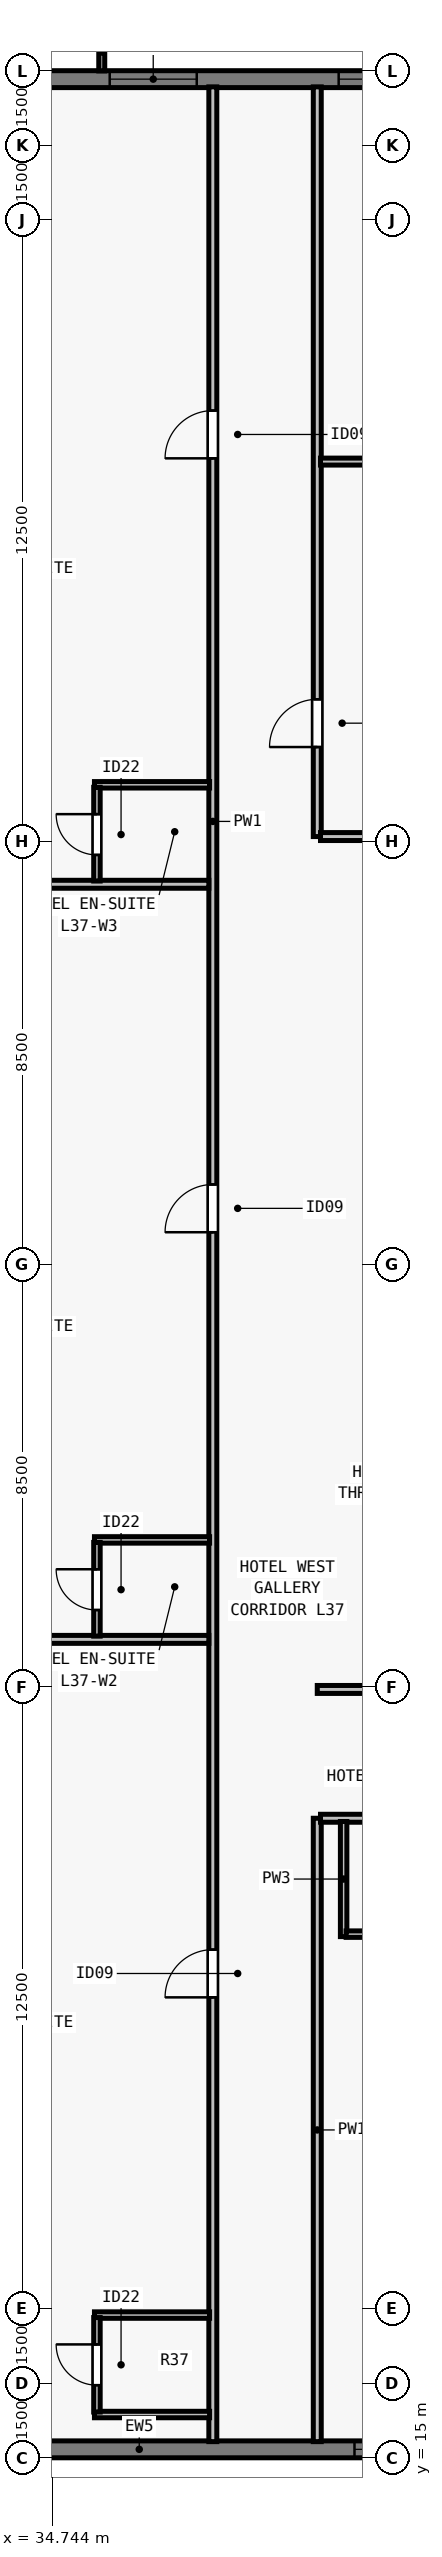
"""IFC4 building model, lengths in metres.
Left out: names, types, materials, properties, quantities, classifications, styles, units other than length and angle.
Written with IfcOpenShell. Run it as: python <this file> out.ifc"""

import sys

from ifc_helpers import new_model, si_unit, direction, frame, frame_2d, origin, place, context, subcontext, project, spatial, rectangle, extrude, element, fill, save


model = new_model("IFC4")
c1 = context("Model", 3, precision=1e-05, world=origin(), true_north=direction((0.0, 1.0)))
c2 = subcontext(c1, "Body", "Model", "MODEL_VIEW")
j1 = project(units=[si_unit("LENGTHUNIT", "METRE"), si_unit("PLANEANGLEUNIT", "RADIAN")], contexts=[c1])
p1 = place(None, origin())
s1 = spatial("IfcSite", under=j1, at=p1, CompositionType="ELEMENT")
p2 = place(p1, origin())
s2 = spatial("IfcBuilding", under=s1, at=p2, CompositionType="ELEMENT")
p3 = place(p2, frame((0.0, 0.0, 137.5)))
s3 = spatial("IfcBuildingStorey", under=s2, at=p3, CompositionType="ELEMENT", Elevation=137.5)
p4 = place(p3, frame((32.0, 62.83, 0.0), z_axis=(0.0, 0.0, 1.0), x_axis=(1.0, 0.0, 0.0)))
e1 = element("IfcWall", 1, at=p4, inside=s3, PredefinedType="SOLIDWALL", context=c2, shape_type="SweptSolid", body=[
    extrude(rectangle(XDim=39.682, YDim=0.34, at=frame_2d((19.841, 0.0))), origin(), (0.0, 0.0, 1.0), 3.28),
])
p5 = place(p4, frame((3.902, 0.0, 0.8)))
e2 = element("IfcOpeningElement", 2, at=p5, cuts=e1, PredefinedType="OPENING", context=c2, shape_type="SweptSolid", body=[
    extrude(rectangle(XDim=1.75, YDim=1.66, at=frame_2d((0.875, 0.83))), frame((0.0, 0.18, 0.0), z_axis=(0.0, -1.0, 0.0), x_axis=(1.0, 0.0, 0.0)), (0.0, 0.0, 1.0), 0.36),
])
p6 = place(p4, frame((8.505, 0.0, 0.8)))
e3 = element("IfcOpeningElement", 3, at=p6, cuts=e1, PredefinedType="OPENING", context=c2, shape_type="SweptSolid", body=[
    extrude(rectangle(XDim=1.35, YDim=1.66, at=frame_2d((0.675, 0.83))), frame((0.0, 0.18, 0.0), z_axis=(0.0, -1.0, 0.0), x_axis=(1.0, 0.0, 0.0)), (0.0, 0.0, 1.0), 0.36),
])
p7 = place(p4, frame((11.859, 0.0, 0.8)))
e4 = element("IfcOpeningElement", 4, at=p7, cuts=e1, PredefinedType="OPENING", context=c2, shape_type="SweptSolid", body=[
    extrude(rectangle(XDim=1.75, YDim=1.66, at=frame_2d((0.875, 0.83))), frame((0.0, 0.18, 0.0), z_axis=(0.0, -1.0, 0.0), x_axis=(1.0, 0.0, 0.0)), (0.0, 0.0, 1.0), 0.36),
])
p8 = place(p4, frame((16.062, 0.0, 0.8)))
e5 = element("IfcOpeningElement", 5, at=p8, cuts=e1, PredefinedType="OPENING", context=c2, shape_type="SweptSolid", body=[
    extrude(rectangle(XDim=1.35, YDim=1.66, at=frame_2d((0.675, 0.83))), frame((0.0, 0.18, 0.0), z_axis=(0.0, -1.0, 0.0), x_axis=(1.0, 0.0, 0.0)), (0.0, 0.0, 1.0), 0.36),
])
p9 = place(p4, frame((17.716, 0.0, 0.8)))
e6 = element("IfcOpeningElement", 6, at=p9, cuts=e1, PredefinedType="OPENING", context=c2, shape_type="SweptSolid", body=[
    extrude(rectangle(XDim=1.75, YDim=1.66, at=frame_2d((0.875, 0.83))), frame((0.0, 0.18, 0.0), z_axis=(0.0, -1.0, 0.0), x_axis=(1.0, 0.0, 0.0)), (0.0, 0.0, 1.0), 0.36),
])
p10 = place(p4, frame((22.719, 0.0, 0.8)))
e7 = element("IfcOpeningElement", 7, at=p10, cuts=e1, PredefinedType="OPENING", context=c2, shape_type="SweptSolid", body=[
    extrude(rectangle(XDim=1.35, YDim=1.66, at=frame_2d((0.675, 0.83))), frame((0.0, 0.18, 0.0), z_axis=(0.0, -1.0, 0.0), x_axis=(1.0, 0.0, 0.0)), (0.0, 0.0, 1.0), 0.36),
])
p11 = place(p4, frame((26.073, 0.0, 0.8)))
e8 = element("IfcOpeningElement", 8, at=p11, cuts=e1, PredefinedType="OPENING", context=c2, shape_type="SweptSolid", body=[
    extrude(rectangle(XDim=1.75, YDim=1.66, at=frame_2d((0.875, 0.83))), frame((0.0, 0.18, 0.0), z_axis=(0.0, -1.0, 0.0), x_axis=(1.0, 0.0, 0.0)), (0.0, 0.0, 1.0), 0.36),
])
p12 = place(p4, frame((30.677, 0.0, 0.8)))
e9 = element("IfcOpeningElement", 9, at=p12, cuts=e1, PredefinedType="OPENING", context=c2, shape_type="SweptSolid", body=[
    extrude(rectangle(XDim=1.35, YDim=1.66, at=frame_2d((0.675, 0.83))), frame((0.0, 0.18, 0.0), z_axis=(0.0, -1.0, 0.0), x_axis=(1.0, 0.0, 0.0)), (0.0, 0.0, 1.0), 0.36),
])
p13 = place(p4, frame((33.18, 0.0, 0.8)))
e10 = element("IfcOpeningElement", 10, at=p13, cuts=e1, PredefinedType="OPENING", context=c2, shape_type="SweptSolid", body=[
    extrude(rectangle(XDim=1.75, YDim=1.66, at=frame_2d((0.875, 0.83))), frame((0.0, 0.18, 0.0), z_axis=(0.0, -1.0, 0.0), x_axis=(1.0, 0.0, 0.0)), (0.0, 0.0, 1.0), 0.36),
])
p14 = place(p3, frame((72.0, 15.17, 0.0), z_axis=(0.0, 0.0, 1.0), x_axis=(-1.0, 0.0, 0.0)))
e11 = element("IfcWall", 11, at=p14, inside=s3, PredefinedType="SOLIDWALL", context=c2, shape_type="SweptSolid", body=[
    extrude(rectangle(XDim=39.682, YDim=0.34, at=frame_2d((19.841, 0.0))), origin(), (0.0, 0.0, 1.0), 3.28),
])
p15 = place(p14, frame((8.055, 0.0, 0.8)))
e12 = element("IfcOpeningElement", 12, at=p15, cuts=e11, PredefinedType="OPENING", context=c2, shape_type="SweptSolid", body=[
    extrude(rectangle(XDim=1.35, YDim=1.66, at=frame_2d((0.675, 0.83))), frame((0.0, 0.18, 0.0), z_axis=(0.0, -1.0, 0.0), x_axis=(1.0, 0.0, 0.0)), (0.0, 0.0, 1.0), 0.36),
])
p16 = place(p14, frame((11.859, 0.0, 0.8)))
e13 = element("IfcOpeningElement", 13, at=p16, cuts=e11, PredefinedType="OPENING", context=c2, shape_type="SweptSolid", body=[
    extrude(rectangle(XDim=1.75, YDim=1.66, at=frame_2d((0.875, 0.83))), frame((0.0, 0.18, 0.0), z_axis=(0.0, -1.0, 0.0), x_axis=(1.0, 0.0, 0.0)), (0.0, 0.0, 1.0), 0.36),
])
p17 = place(p14, frame((16.062, 0.0, 0.8)))
e14 = element("IfcOpeningElement", 14, at=p17, cuts=e11, PredefinedType="OPENING", context=c2, shape_type="SweptSolid", body=[
    extrude(rectangle(XDim=1.35, YDim=1.66, at=frame_2d((0.675, 0.83))), frame((0.0, 0.18, 0.0), z_axis=(0.0, -1.0, 0.0), x_axis=(1.0, 0.0, 0.0)), (0.0, 0.0, 1.0), 0.36),
])
p18 = place(p14, frame((18.966, 0.0, 0.8)))
e15 = element("IfcOpeningElement", 15, at=p18, cuts=e11, PredefinedType="OPENING", context=c2, shape_type="SweptSolid", body=[
    extrude(rectangle(XDim=1.75, YDim=1.66, at=frame_2d((0.875, 0.83))), frame((0.0, 0.18, 0.0), z_axis=(0.0, -1.0, 0.0), x_axis=(1.0, 0.0, 0.0)), (0.0, 0.0, 1.0), 0.36),
])
p19 = place(p14, frame((22.719, 0.0, 0.8)))
e16 = element("IfcOpeningElement", 16, at=p19, cuts=e11, PredefinedType="OPENING", context=c2, shape_type="SweptSolid", body=[
    extrude(rectangle(XDim=1.35, YDim=1.66, at=frame_2d((0.675, 0.83))), frame((0.0, 0.18, 0.0), z_axis=(0.0, -1.0, 0.0), x_axis=(1.0, 0.0, 0.0)), (0.0, 0.0, 1.0), 0.36),
])
p20 = place(p14, frame((26.523, 0.0, 0.8)))
e17 = element("IfcOpeningElement", 17, at=p20, cuts=e11, PredefinedType="OPENING", context=c2, shape_type="SweptSolid", body=[
    extrude(rectangle(XDim=1.75, YDim=1.66, at=frame_2d((0.875, 0.83))), frame((0.0, 0.18, 0.0), z_axis=(0.0, -1.0, 0.0), x_axis=(1.0, 0.0, 0.0)), (0.0, 0.0, 1.0), 0.36),
])
p21 = place(p14, frame((29.827, 0.0, 0.8)))
e18 = element("IfcOpeningElement", 18, at=p21, cuts=e11, PredefinedType="OPENING", context=c2, shape_type="SweptSolid", body=[
    extrude(rectangle(XDim=1.35, YDim=1.66, at=frame_2d((0.675, 0.83))), frame((0.0, 0.18, 0.0), z_axis=(0.0, -1.0, 0.0), x_axis=(1.0, 0.0, 0.0)), (0.0, 0.0, 1.0), 0.36),
])
p22 = place(p3, frame((37.975, 15.325, 0.0), z_axis=(0.0, 0.0, 1.0), x_axis=(0.0, 1.0, 0.0)))
e19 = element("IfcWall", 19, at=p22, inside=s3, PredefinedType="PARTITIONING", context=c2, shape_type="SweptSolid", body=[
    extrude(rectangle(XDim=47.35, YDim=0.16, at=frame_2d((23.675, 0.0))), origin(), (0.0, 0.0, 1.0), 2.555),
])
p23 = place(p22, frame((8.934, 0.0, 0.0)))
e20 = element("IfcOpeningElement", 20, at=p23, cuts=e19, PredefinedType="OPENING", context=c2, shape_type="SweptSolid", body=[
    extrude(rectangle(XDim=0.96, YDim=2.15, at=frame_2d((0.48, 1.075))), frame((0.0, 0.09, 0.0), z_axis=(0.0, -1.0, 0.0), x_axis=(1.0, 0.0, 0.0)), (0.0, 0.0, 1.0), 0.18),
])
p24 = place(p22, frame((24.319, 0.0, 0.0)))
e21 = element("IfcOpeningElement", 21, at=p24, cuts=e19, PredefinedType="OPENING", context=c2, shape_type="SweptSolid", body=[
    extrude(rectangle(XDim=0.96, YDim=2.15, at=frame_2d((0.48, 1.075))), frame((0.0, 0.09, 0.0), z_axis=(0.0, -1.0, 0.0), x_axis=(1.0, 0.0, 0.0)), (0.0, 0.0, 1.0), 0.18),
])
p25 = place(p22, frame((39.88, 0.0, 0.0)))
e22 = element("IfcOpeningElement", 22, at=p25, cuts=e19, PredefinedType="OPENING", context=c2, shape_type="SweptSolid", body=[
    extrude(rectangle(XDim=0.96, YDim=2.15, at=frame_2d((0.48, 1.075))), frame((0.0, 0.09, 0.0), z_axis=(0.0, -1.0, 0.0), x_axis=(1.0, 0.0, 0.0)), (0.0, 0.0, 1.0), 0.18),
])
p26 = place(p3, frame((40.075, 15.325, 0.0), z_axis=(0.0, 0.0, 1.0), x_axis=(0.0, 1.0, 0.0)))
e23 = element("IfcWall", 23, at=p26, inside=s3, PredefinedType="PARTITIONING", context=c2, shape_type="SweptSolid", body=[
    extrude(rectangle(XDim=12.535, YDim=0.16, at=frame_2d((6.268, 0.0))), origin(), (0.0, 0.0, 1.0), 2.555),
])
p27 = place(p3, frame((40.075, 47.6, 0.0), z_axis=(0.0, 0.0, 1.0), x_axis=(0.0, 1.0, 0.0)))
e24 = element("IfcWall", 24, at=p27, inside=s3, PredefinedType="PARTITIONING", context=c2, shape_type="SweptSolid", body=[
    extrude(rectangle(XDim=15.075, YDim=0.16, at=frame_2d((7.538, 0.0))), origin(), (0.0, 0.0, 1.0), 2.555),
])
p28 = place(p27, frame((1.8, 0.0, 0.0)))
e25 = element("IfcOpeningElement", 25, at=p28, cuts=e24, PredefinedType="OPENING", context=c2, shape_type="SweptSolid", body=[
    extrude(rectangle(XDim=0.96, YDim=2.12, at=frame_2d((0.48, 1.06))), frame((0.0, 0.09, 0.0), z_axis=(0.0, -1.0, 0.0), x_axis=(1.0, 0.0, 0.0)), (0.0, 0.0, 1.0), 0.18),
])
p29 = place(p3, frame((40.075, 30.45, 0.0), z_axis=(0.0, 0.0, 1.0), x_axis=(1.0, 0.0, 0.0)))
e26 = element("IfcWall", 26, at=p29, inside=s3, PredefinedType="PARTITIONING", context=c2, shape_type="SweptSolid", body=[
    extrude(rectangle(XDim=3.16, YDim=0.16, at=frame_2d((1.58, 0.0))), origin(), (0.0, 0.0, 1.0), 3.28),
])
p30 = place(p3, frame((40.14, 47.6, 0.0), z_axis=(0.0, 0.0, 1.0), x_axis=(1.0, 0.0, 0.0)))
e27 = element("IfcWall", 27, at=p30, inside=s3, PredefinedType="PARTITIONING", context=c2, shape_type="SweptSolid", body=[
    extrude(rectangle(XDim=3.095, YDim=0.16, at=frame_2d((1.548, 0.0))), origin(), (0.0, 0.0, 1.0), 3.28),
])
p31 = place(p3, frame((40.14, 27.86, 0.0), z_axis=(0.0, 0.0, 1.0), x_axis=(1.0, 0.0, 0.0)))
e28 = element("IfcWall", 28, at=p31, inside=s3, PredefinedType="PARTITIONING", context=c2, shape_type="SweptSolid", body=[
    extrude(rectangle(XDim=22.07, YDim=0.16, at=frame_2d((11.035, 0.0))), origin(), (0.0, 0.0, 1.0), 3.28),
])
p32 = place(p31, frame((3.834, 0.0, 0.0)))
e29 = element("IfcOpeningElement", 29, at=p32, cuts=e28, PredefinedType="OPENING", context=c2, shape_type="SweptSolid", body=[
    extrude(rectangle(XDim=0.96, YDim=2.15, at=frame_2d((0.48, 1.075))), frame((0.0, 0.09, 0.0), z_axis=(0.0, -1.0, 0.0), x_axis=(1.0, 0.0, 0.0)), (0.0, 0.0, 1.0), 0.18),
])
p33 = place(p31, frame((8.746, 0.0, 0.0)))
e30 = element("IfcOpeningElement", 30, at=p33, cuts=e28, PredefinedType="OPENING", context=c2, shape_type="SweptSolid", body=[
    extrude(rectangle(XDim=0.96, YDim=2.15, at=frame_2d((0.48, 1.075))), frame((0.0, 0.09, 0.0), z_axis=(0.0, -1.0, 0.0), x_axis=(1.0, 0.0, 0.0)), (0.0, 0.0, 1.0), 0.18),
])
p34 = place(p31, frame((14.46, 0.0, 0.0)))
e31 = element("IfcOpeningElement", 31, at=p34, cuts=e28, PredefinedType="OPENING", context=c2, shape_type="SweptSolid", body=[
    extrude(rectangle(XDim=0.96, YDim=2.15, at=frame_2d((0.48, 1.075))), frame((0.0, 0.09, 0.0), z_axis=(0.0, -1.0, 0.0), x_axis=(1.0, 0.0, 0.0)), (0.0, 0.0, 1.0), 0.18),
])
p35 = place(p31, frame((19.993, 0.0, 0.0)))
e32 = element("IfcOpeningElement", 32, at=p35, cuts=e28, PredefinedType="OPENING", context=c2, shape_type="SweptSolid", body=[
    extrude(rectangle(XDim=0.96, YDim=2.15, at=frame_2d((0.48, 1.075))), frame((0.0, 0.09, 0.0), z_axis=(0.0, -1.0, 0.0), x_axis=(1.0, 0.0, 0.0)), (0.0, 0.0, 1.0), 0.18),
])
p36 = place(p3, frame((40.14, 55.14, 0.0), z_axis=(0.0, 0.0, 1.0), x_axis=(1.0, 0.0, 0.0)))
e33 = element("IfcWall", 33, at=p36, inside=s3, PredefinedType="PARTITIONING", context=c2, shape_type="SweptSolid", body=[
    extrude(rectangle(XDim=22.07, YDim=0.14, at=frame_2d((11.035, 0.0))), origin(), (0.0, 0.0, 1.0), 3.28),
])
p37 = place(p36, frame((3.435, 0.0, 0.0)))
e34 = element("IfcOpeningElement", 34, at=p37, cuts=e33, PredefinedType="OPENING", context=c2, shape_type="SweptSolid", body=[
    extrude(rectangle(XDim=0.92, YDim=2.12, at=frame_2d((0.46, 1.06))), frame((0.0, 0.08, 0.0), z_axis=(0.0, -1.0, 0.0), x_axis=(1.0, 0.0, 0.0)), (0.0, 0.0, 1.0), 0.16),
])
p38 = place(p36, frame((14.435, 0.0, 0.0)))
e35 = element("IfcOpeningElement", 35, at=p38, cuts=e33, PredefinedType="OPENING", context=c2, shape_type="SweptSolid", body=[
    extrude(rectangle(XDim=0.92, YDim=2.12, at=frame_2d((0.46, 1.06))), frame((0.0, 0.08, 0.0), z_axis=(0.0, -1.0, 0.0), x_axis=(1.0, 0.0, 0.0)), (0.0, 0.0, 1.0), 0.16),
])
p39 = place(p3, frame((40.605, 25.48, 0.0), z_axis=(0.0, 0.0, 1.0), x_axis=(0.0, 1.0, 0.0)))
e36 = element("IfcWall", 36, at=p39, inside=s3, PredefinedType="PLUMBINGWALL", context=c2, shape_type="SweptSolid", body=[
    extrude(rectangle(XDim=2.315, YDim=0.13, at=frame_2d((1.157, 0.0))), origin(), (0.0, 0.0, 1.0), 2.555),
])
p40 = place(p3, frame((40.655, 25.53, 0.0), z_axis=(0.0, 0.0, 1.0), x_axis=(1.0, 0.0, 0.0)))
e37 = element("IfcWall", 37, at=p40, inside=s3, PredefinedType="PLUMBINGWALL", context=c2, shape_type="SweptSolid", body=[
    extrude(rectangle(XDim=1.9, YDim=0.13, at=frame_2d((0.95, 0.0))), origin(), (0.0, 0.0, 1.0), 3.28),
])
p41 = place(p40, frame((0.54, 0.0, 0.0)))
e38 = element("IfcOpeningElement", 38, at=p41, cuts=e37, PredefinedType="OPENING", context=c2, shape_type="SweptSolid", body=[
    extrude(rectangle(XDim=0.82, YDim=2.1, at=frame_2d((0.41, 1.05))), frame((0.0, 0.075, 0.0), z_axis=(0.0, -1.0, 0.0), x_axis=(1.0, 0.0, 0.0)), (0.0, 0.0, 1.0), 0.15),
])
for number, where, z_axis, x_axis in (
    (39, (35.595, 15.87, 0.0), (0.0, 0.0, 1.0), (1.0, 0.0, 0.0)),
    (40, (35.595, 17.87, 0.0), (0.0, 0.0, 1.0), (1.0, 0.0, 0.0)),
):
    element("IfcWall", number, at=place(p3, frame(where, z_axis=z_axis, x_axis=x_axis)), inside=s3, PredefinedType="PLUMBINGWALL", context=c2, shape_type="SweptSolid", body=[
        extrude(rectangle(XDim=2.315, YDim=0.13, at=frame_2d((1.157, 0.0))), origin(), (0.0, 0.0, 1.0), 3.28),
    ])
p42 = place(p3, frame((35.645, 15.92, 0.0), z_axis=(0.0, 0.0, 1.0), x_axis=(0.0, 1.0, 0.0)))
e41 = element("IfcWall", 41, at=p42, inside=s3, PredefinedType="PLUMBINGWALL", context=c2, shape_type="SweptSolid", body=[
    extrude(rectangle(XDim=1.9, YDim=0.13, at=frame_2d((0.95, 0.0))), origin(), (0.0, 0.0, 1.0), 3.28),
])
p43 = place(p42, frame((0.54, 0.0, 0.0)))
e42 = element("IfcOpeningElement", 42, at=p43, cuts=e41, PredefinedType="OPENING", context=c2, shape_type="SweptSolid", body=[
    extrude(rectangle(XDim=0.82, YDim=2.1, at=frame_2d((0.41, 1.05))), frame((0.0, 0.075, 0.0), z_axis=(0.0, -1.0, 0.0), x_axis=(1.0, 0.0, 0.0)), (0.0, 0.0, 1.0), 0.15),
])
p44 = place(p3, frame((28.27, 31.457, 0.0), z_axis=(0.0, 0.0, 1.0), x_axis=(1.0, 0.0, 0.0)))
e43 = element("IfcWall", 43, at=p44, inside=s3, PredefinedType="PARTITIONING", context=c2, shape_type="SweptSolid", body=[
    extrude(rectangle(XDim=9.625, YDim=0.16, at=frame_2d((4.812, 0.0))), origin(), (0.0, 0.0, 1.0), 3.28),
])
p45 = place(p3, frame((35.595, 33.457, 0.0), z_axis=(0.0, 0.0, 1.0), x_axis=(1.0, 0.0, 0.0)))
e44 = element("IfcWall", 44, at=p45, inside=s3, PredefinedType="PLUMBINGWALL", context=c2, shape_type="SweptSolid", body=[
    extrude(rectangle(XDim=2.315, YDim=0.13, at=frame_2d((1.157, 0.0))), origin(), (0.0, 0.0, 1.0), 3.28),
])
p46 = place(p3, frame((35.645, 31.522, 0.0), z_axis=(0.0, 0.0, 1.0), x_axis=(0.0, 1.0, 0.0)))
e45 = element("IfcWall", 45, at=p46, inside=s3, PredefinedType="PLUMBINGWALL", context=c2, shape_type="SweptSolid", body=[
    extrude(rectangle(XDim=1.885, YDim=0.13, at=frame_2d((0.942, 0.0))), origin(), (0.0, 0.0, 1.0), 3.28),
])
p47 = place(p46, frame((0.525, 0.0, 0.0)))
e46 = element("IfcOpeningElement", 46, at=p47, cuts=e45, PredefinedType="OPENING", context=c2, shape_type="SweptSolid", body=[
    extrude(rectangle(XDim=0.82, YDim=2.1, at=frame_2d((0.41, 1.05))), frame((0.0, 0.075, 0.0), z_axis=(0.0, -1.0, 0.0), x_axis=(1.0, 0.0, 0.0)), (0.0, 0.0, 1.0), 0.15),
])
p48 = place(p3, frame((28.325, 46.641, 0.0), z_axis=(0.0, 0.0, 1.0), x_axis=(1.0, 0.0, 0.0)))
e47 = element("IfcWall", 47, at=p48, inside=s3, PredefinedType="PARTITIONING", context=c2, shape_type="SweptSolid", body=[
    extrude(rectangle(XDim=9.57, YDim=0.16, at=frame_2d((4.785, 0.0))), origin(), (0.0, 0.0, 1.0), 3.28),
])
p49 = place(p3, frame((35.595, 48.641, 0.0), z_axis=(0.0, 0.0, 1.0), x_axis=(1.0, 0.0, 0.0)))
e48 = element("IfcWall", 48, at=p49, inside=s3, PredefinedType="PLUMBINGWALL", context=c2, shape_type="SweptSolid", body=[
    extrude(rectangle(XDim=2.315, YDim=0.13, at=frame_2d((1.157, 0.0))), origin(), (0.0, 0.0, 1.0), 3.28),
])
p50 = place(p3, frame((35.645, 46.706, 0.0), z_axis=(0.0, 0.0, 1.0), x_axis=(0.0, 1.0, 0.0)))
e49 = element("IfcWall", 49, at=p50, inside=s3, PredefinedType="PLUMBINGWALL", context=c2, shape_type="SweptSolid", body=[
    extrude(rectangle(XDim=1.885, YDim=0.13, at=frame_2d((0.942, 0.0))), origin(), (0.0, 0.0, 1.0), 3.28),
])
p51 = place(p50, frame((0.525, 0.0, 0.0)))
e50 = element("IfcOpeningElement", 50, at=p51, cuts=e49, PredefinedType="OPENING", context=c2, shape_type="SweptSolid", body=[
    extrude(rectangle(XDim=0.82, YDim=2.1, at=frame_2d((0.41, 1.05))), frame((0.0, 0.075, 0.0), z_axis=(0.0, -1.0, 0.0), x_axis=(1.0, 0.0, 0.0)), (0.0, 0.0, 1.0), 0.15),
])
p52 = place(p5, origin())
e51 = element("IfcWindow", 51, at=p52, inside=s3, PartitioningType="SINGLE_PANEL", PredefinedType="WINDOW", context=c2, shape_type="SweptSolid", body=[
    extrude(rectangle(XDim=1.75, YDim=1.66, at=frame_2d((0.875, 0.83))), frame((0.0, -0.05, 0.0), z_axis=(0.0, -1.0, 0.0), x_axis=(1.0, 0.0, 0.0)), (0.0, 0.0, 1.0), 0.06),
])
fill(e2, e51)
p53 = place(p6, origin())
e52 = element("IfcWindow", 52, at=p53, inside=s3, PartitioningType="SINGLE_PANEL", PredefinedType="WINDOW", context=c2, shape_type="SweptSolid", body=[
    extrude(rectangle(XDim=1.35, YDim=1.66, at=frame_2d((0.675, 0.83))), frame((0.0, -0.05, 0.0), z_axis=(0.0, -1.0, 0.0), x_axis=(1.0, 0.0, 0.0)), (0.0, 0.0, 1.0), 0.06),
])
fill(e3, e52)
p54 = place(p21, origin())
e53 = element("IfcWindow", 53, at=p54, inside=s3, PartitioningType="SINGLE_PANEL", PredefinedType="WINDOW", context=c2, shape_type="SweptSolid", body=[
    extrude(rectangle(XDim=1.35, YDim=1.66, at=frame_2d((0.675, 0.83))), frame((0.0, -0.05, 0.0), z_axis=(0.0, -1.0, 0.0), x_axis=(1.0, 0.0, 0.0)), (0.0, 0.0, 1.0), 0.06),
])
fill(e18, e53)
p55 = place(p28, origin())
e54 = element("IfcDoor", 54, at=p55, inside=s3, OperationType="SINGLE_SWING_LEFT", PredefinedType="DOOR", context=c2, shape_type="SweptSolid", body=[
    extrude(rectangle(XDim=0.96, YDim=2.12, at=frame_2d((0.48, 1.06))), frame((0.0, 0.025, 0.0), z_axis=(0.0, -1.0, 0.0), x_axis=(1.0, 0.0, 0.0)), (0.0, 0.0, 1.0), 0.05),
])
fill(e25, e54)
p56 = place(p43, origin())
e55 = element("IfcDoor", 55, at=p56, inside=s3, OperationType="SINGLE_SWING_RIGHT", PredefinedType="DOOR", context=c2, shape_type="SweptSolid", body=[
    extrude(rectangle(XDim=0.82, YDim=2.1, at=frame_2d((0.41, 1.05))), frame((0.0, 0.025, 0.0), z_axis=(0.0, -1.0, 0.0), x_axis=(1.0, 0.0, 0.0)), (0.0, 0.0, 1.0), 0.05),
])
fill(e42, e55)
p57 = place(p23, origin())
e56 = element("IfcDoor", 56, at=p57, inside=s3, OperationType="SINGLE_SWING_LEFT", PredefinedType="DOOR", context=c2, shape_type="SweptSolid", body=[
    extrude(rectangle(XDim=0.96, YDim=2.15, at=frame_2d((0.48, 1.075))), frame((0.0, 0.025, 0.0), z_axis=(0.0, -1.0, 0.0), x_axis=(1.0, 0.0, 0.0)), (0.0, 0.0, 1.0), 0.05),
])
fill(e20, e56)
p58 = place(p47, origin())
e57 = element("IfcDoor", 57, at=p58, inside=s3, OperationType="SINGLE_SWING_RIGHT", PredefinedType="DOOR", context=c2, shape_type="SweptSolid", body=[
    extrude(rectangle(XDim=0.82, YDim=2.1, at=frame_2d((0.41, 1.05))), frame((0.0, 0.025, 0.0), z_axis=(0.0, -1.0, 0.0), x_axis=(1.0, 0.0, 0.0)), (0.0, 0.0, 1.0), 0.05),
])
fill(e46, e57)
p59 = place(p24, origin())
e58 = element("IfcDoor", 58, at=p59, inside=s3, OperationType="SINGLE_SWING_LEFT", PredefinedType="DOOR", context=c2, shape_type="SweptSolid", body=[
    extrude(rectangle(XDim=0.96, YDim=2.15, at=frame_2d((0.48, 1.075))), frame((0.0, 0.025, 0.0), z_axis=(0.0, -1.0, 0.0), x_axis=(1.0, 0.0, 0.0)), (0.0, 0.0, 1.0), 0.05),
])
fill(e21, e58)
p60 = place(p51, origin())
e59 = element("IfcDoor", 59, at=p60, inside=s3, OperationType="SINGLE_SWING_RIGHT", PredefinedType="DOOR", context=c2, shape_type="SweptSolid", body=[
    extrude(rectangle(XDim=0.82, YDim=2.1, at=frame_2d((0.41, 1.05))), frame((0.0, 0.025, 0.0), z_axis=(0.0, -1.0, 0.0), x_axis=(1.0, 0.0, 0.0)), (0.0, 0.0, 1.0), 0.05),
])
fill(e50, e59)
p61 = place(p25, origin())
e60 = element("IfcDoor", 60, at=p61, inside=s3, OperationType="SINGLE_SWING_LEFT", PredefinedType="DOOR", context=c2, shape_type="SweptSolid", body=[
    extrude(rectangle(XDim=0.96, YDim=2.15, at=frame_2d((0.48, 1.075))), frame((0.0, 0.025, 0.0), z_axis=(0.0, -1.0, 0.0), x_axis=(1.0, 0.0, 0.0)), (0.0, 0.0, 1.0), 0.05),
])
fill(e22, e60)
save(model, sys.argv[1])
